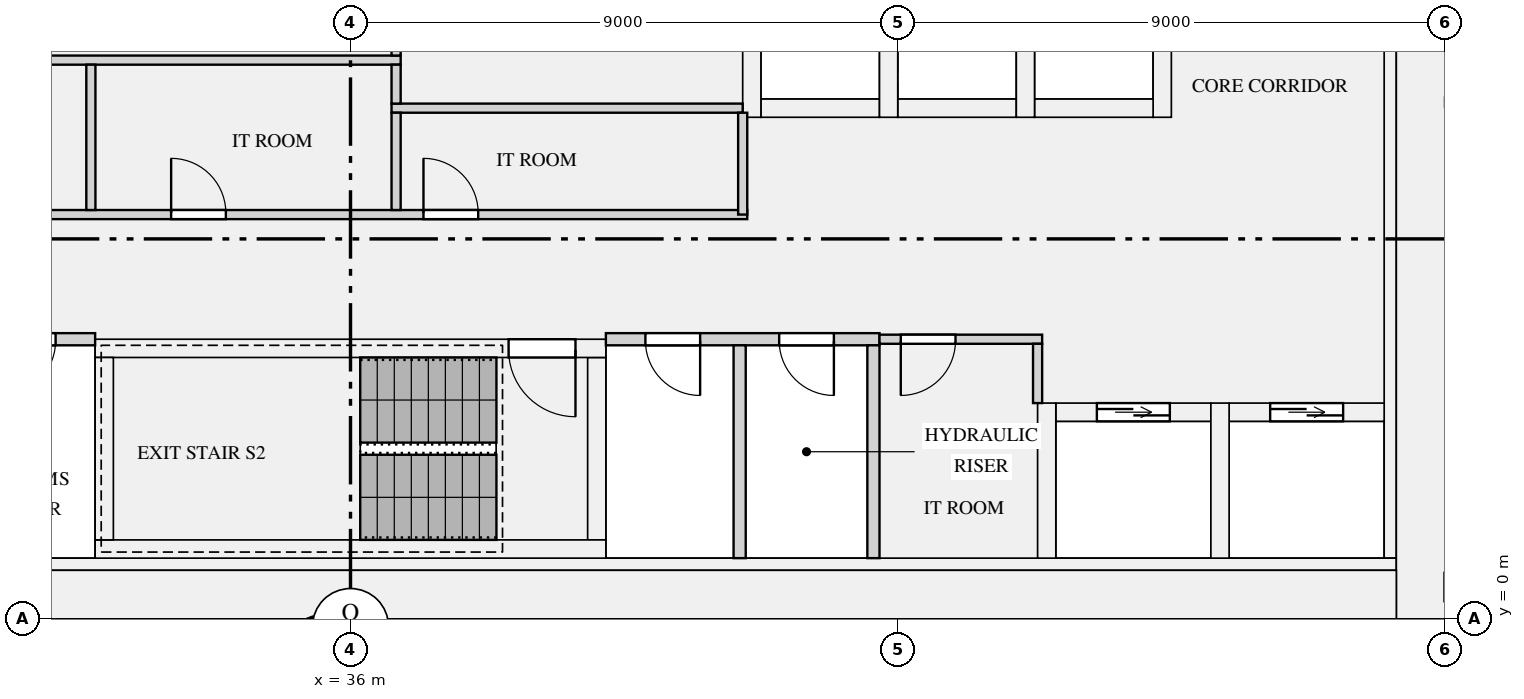
"""IFC4 building model, lengths in metres.
Left out: names, types, materials, properties, quantities, classifications, styles, units other than length and angle.
Written with IfcOpenShell. Run it as: python <this file> out.ifc"""

import sys

from ifc_helpers import new_model, si_unit, direction, frame, frame_2d, origin, place, context, subcontext, project, spatial, rectangle, extrude, element, fill, save


model = new_model("IFC4")
c1 = context("Model", 3, precision=1e-05, world=origin(), true_north=direction((0.0, 1.0)))
c2 = subcontext(c1, "Body", "Model", "MODEL_VIEW")
j1 = project(units=[si_unit("LENGTHUNIT", "METRE"), si_unit("PLANEANGLEUNIT", "RADIAN")], contexts=[c1])
p1 = place(None, origin())
s1 = spatial("IfcSite", under=j1, at=p1, CompositionType="ELEMENT")
p2 = place(p1, origin())
s2 = spatial("IfcBuilding", under=s1, at=p2, CompositionType="ELEMENT")
p3 = place(p2, frame((0.0, 0.0, 118.2)))
s3 = spatial("IfcBuildingStorey", under=s2, at=p3, CompositionType="ELEMENT", Elevation=118.2)
p4 = place(p3, frame((53.6, 0.0, 0.0), z_axis=(0.0, 0.0, 1.0), x_axis=(0.0, 1.0, 0.0)))
e1 = element("IfcWall", 1, at=p4, inside=s3, PredefinedType="SHEAR", context=c2, shape_type="SweptSolid", body=[
    extrude(rectangle(XDim=12.5, YDim=0.8, at=frame_2d((6.25, 0.0))), origin(), (0.0, 0.0, 1.0), 3.15),
])
p5 = place(p3, frame((18.8, 0.4, 0.0), z_axis=(0.0, 0.0, 1.0), x_axis=(1.0, 0.0, 0.0)))
e2 = element("IfcWall", 2, at=p5, inside=s3, PredefinedType="SHEAR", context=c2, shape_type="SweptSolid", body=[
    extrude(rectangle(XDim=34.4, YDim=0.8, at=frame_2d((17.2, 0.0))), origin(), (0.0, 0.0, 1.0), 3.15),
])
p6 = place(p3, frame((53.1, 1.0, 0.0), z_axis=(0.0, 0.0, 1.0), x_axis=(0.0, 1.0, 0.0)))
e3 = element("IfcWall", 3, at=p6, inside=s3, PredefinedType="SHEAR", context=c2, shape_type="SweptSolid", body=[
    extrude(rectangle(XDim=10.9, YDim=0.2, at=frame_2d((5.45, 0.0))), origin(), (0.0, 0.0, 1.0), 3.15),
])
p7 = place(p3, frame((18.8, 0.9, 0.0), z_axis=(0.0, 0.0, 1.0), x_axis=(1.0, 0.0, 0.0)))
e4 = element("IfcWall", 4, at=p7, inside=s3, PredefinedType="SHEAR", context=c2, shape_type="SweptSolid", body=[
    extrude(rectangle(XDim=34.4, YDim=0.2, at=frame_2d((17.2, 0.0))), origin(), (0.0, 0.0, 1.0), 3.15),
])
p8 = place(p3, frame((42.75, 8.4, 0.0), z_axis=(0.0, 0.0, 1.0), x_axis=(1.0, 0.0, 0.0)))
e5 = element("IfcWall", 5, at=p8, inside=s3, PredefinedType="SHEAR", context=c2, shape_type="SweptSolid", body=[
    extrude(rectangle(XDim=1.95, YDim=0.3, at=frame_2d((0.975, 0.0))), origin(), (0.0, 0.0, 1.0), 3.15),
])
p9 = place(p3, frame((42.6, 8.25, 0.0), z_axis=(0.0, 0.0, 1.0), x_axis=(0.0, 1.0, 0.0)))
e6 = element("IfcWall", 6, at=p9, inside=s3, PredefinedType="SHEAR", context=c2, shape_type="SweptSolid", body=[
    extrude(rectangle(XDim=3.65, YDim=0.3, at=frame_2d((1.825, 0.0))), origin(), (0.0, 0.0, 1.0), 3.15),
])
p10 = place(p3, frame((45.0, 8.4, 0.0), z_axis=(0.0, 0.0, 1.0), x_axis=(1.0, 0.0, 0.0)))
e7 = element("IfcWall", 7, at=p10, inside=s3, PredefinedType="SHEAR", context=c2, shape_type="SweptSolid", body=[
    extrude(rectangle(XDim=1.95, YDim=0.3, at=frame_2d((0.975, 0.0))), origin(), (0.0, 0.0, 1.0), 3.15),
])
p11 = place(p3, frame((44.85, 8.25, 0.0), z_axis=(0.0, 0.0, 1.0), x_axis=(0.0, 1.0, 0.0)))
e8 = element("IfcWall", 8, at=p11, inside=s3, PredefinedType="SHEAR", context=c2, shape_type="SweptSolid", body=[
    extrude(rectangle(XDim=3.65, YDim=0.3, at=frame_2d((1.825, 0.0))), origin(), (0.0, 0.0, 1.0), 3.15),
])
p12 = place(p3, frame((47.25, 8.4, 0.0), z_axis=(0.0, 0.0, 1.0), x_axis=(1.0, 0.0, 0.0)))
e9 = element("IfcWall", 9, at=p12, inside=s3, PredefinedType="SHEAR", context=c2, shape_type="SweptSolid", body=[
    extrude(rectangle(XDim=1.95, YDim=0.3, at=frame_2d((0.975, 0.0))), origin(), (0.0, 0.0, 1.0), 3.15),
])
for number, where, z_axis, x_axis in (
    (10, (47.1, 8.25, 0.0), (0.0, 0.0, 1.0), (0.0, 1.0, 0.0)),
    (11, (49.35, 8.25, 0.0), (0.0, 0.0, 1.0), (0.0, 1.0, 0.0)),
):
    element("IfcWall", number, at=place(p3, frame(where, z_axis=z_axis, x_axis=x_axis)), inside=s3, PredefinedType="SHEAR", context=c2, shape_type="SweptSolid", body=[
        extrude(rectangle(XDim=3.65, YDim=0.3, at=frame_2d((1.825, 0.0))), origin(), (0.0, 0.0, 1.0), 3.15),
    ])
p13 = place(p3, frame((47.6, 3.4, 0.0), z_axis=(0.0, 0.0, 1.0), x_axis=(1.0, 0.0, 0.0)))
e12 = element("IfcWall", 12, at=p13, inside=s3, PredefinedType="SHEAR", context=c2, shape_type="SweptSolid", body=[
    extrude(rectangle(XDim=2.55, YDim=0.3, at=frame_2d((1.275, 0.0))), origin(), (0.0, 0.0, 1.0), 3.15),
])
p14 = place(p13, frame((0.675, 0.0, 0.0)))
e13 = element("IfcOpeningElement", 13, at=p14, cuts=e12, PredefinedType="OPENING", context=c2, shape_type="SweptSolid", body=[
    extrude(rectangle(XDim=1.2, YDim=2.1, at=frame_2d((0.6, 1.05))), frame((0.0, 0.16, 0.0), z_axis=(0.0, -1.0, 0.0), x_axis=(1.0, 0.0, 0.0)), (0.0, 0.0, 1.0), 0.32),
])
p15 = place(p3, frame((47.45, 1.0, 0.0), z_axis=(0.0, 0.0, 1.0), x_axis=(0.0, 1.0, 0.0)))
e14 = element("IfcWall", 14, at=p15, inside=s3, PredefinedType="SHEAR", context=c2, shape_type="SweptSolid", body=[
    extrude(rectangle(XDim=2.55, YDim=0.3, at=frame_2d((1.275, 0.0))), origin(), (0.0, 0.0, 1.0), 3.15),
])
p16 = place(p3, frame((50.45, 3.4, 0.0), z_axis=(0.0, 0.0, 1.0), x_axis=(1.0, 0.0, 0.0)))
e15 = element("IfcWall", 15, at=p16, inside=s3, PredefinedType="SHEAR", context=c2, shape_type="SweptSolid", body=[
    extrude(rectangle(XDim=2.55, YDim=0.3, at=frame_2d((1.275, 0.0))), origin(), (0.0, 0.0, 1.0), 3.15),
])
p17 = place(p16, frame((0.675, 0.0, 0.0)))
e16 = element("IfcOpeningElement", 16, at=p17, cuts=e15, PredefinedType="OPENING", context=c2, shape_type="SweptSolid", body=[
    extrude(rectangle(XDim=1.2, YDim=2.1, at=frame_2d((0.6, 1.05))), frame((0.0, 0.16, 0.0), z_axis=(0.0, -1.0, 0.0), x_axis=(1.0, 0.0, 0.0)), (0.0, 0.0, 1.0), 0.32),
])
p18 = place(p3, frame((50.3, 1.0, 0.0), z_axis=(0.0, 0.0, 1.0), x_axis=(0.0, 1.0, 0.0)))
e17 = element("IfcWall", 17, at=p18, inside=s3, PredefinedType="SHEAR", context=c2, shape_type="SweptSolid", body=[
    extrude(rectangle(XDim=2.55, YDim=0.3, at=frame_2d((1.275, 0.0))), origin(), (0.0, 0.0, 1.0), 3.15),
])
p19 = place(p3, frame((31.8, 1.15, 0.0), z_axis=(0.0, 0.0, 1.0), x_axis=(1.0, 0.0, 0.0)))
e18 = element("IfcWall", 18, at=p19, inside=s3, PredefinedType="SHEAR", context=c2, shape_type="SweptSolid", body=[
    extrude(rectangle(XDim=8.4, YDim=0.3, at=frame_2d((4.2, 0.0))), origin(), (0.0, 0.0, 1.0), 3.15),
])
p20 = place(p3, frame((31.8, 4.45, 0.0), z_axis=(0.0, 0.0, 1.0), x_axis=(1.0, 0.0, 0.0)))
e19 = element("IfcWall", 19, at=p20, inside=s3, PredefinedType="SHEAR", context=c2, shape_type="SweptSolid", body=[
    extrude(rectangle(XDim=8.4, YDim=0.3, at=frame_2d((4.2, 0.0))), origin(), (0.0, 0.0, 1.0), 3.15),
])
p21 = place(p20, frame((6.8, 0.0, 0.0)))
e20 = element("IfcOpeningElement", 20, at=p21, cuts=e19, PredefinedType="OPENING", context=c2, shape_type="SweptSolid", body=[
    extrude(rectangle(XDim=1.1, YDim=2.1, at=frame_2d((0.55, 1.05))), frame((0.0, 0.16, 0.0), z_axis=(0.0, -1.0, 0.0), x_axis=(1.0, 0.0, 0.0)), (0.0, 0.0, 1.0), 0.32),
])
for number, where, z_axis, x_axis in (
    (21, (31.95, 1.3, 0.0), (0.0, 0.0, 1.0), (0.0, 1.0, 0.0)),
    (22, (40.05, 1.3, 0.0), (0.0, 0.0, 1.0), (0.0, 1.0, 0.0)),
):
    element("IfcWall", number, at=place(p3, frame(where, z_axis=z_axis, x_axis=x_axis)), inside=s3, PredefinedType="SHEAR", context=c2, shape_type="SweptSolid", body=[
        extrude(rectangle(XDim=3.0, YDim=0.3, at=frame_2d((1.5, 0.0))), origin(), (0.0, 0.0, 1.0), 3.15),
    ])
p22 = place(p3, frame((27.3, 4.6, 0.0), z_axis=(0.0, 0.0, 1.0), x_axis=(1.0, 0.0, 0.0)))
e23 = element("IfcWall", 23, at=p22, inside=s3, PredefinedType="PARTITIONING", context=c2, shape_type="SweptSolid", body=[
    extrude(rectangle(XDim=4.5, YDim=0.2, at=frame_2d((2.25, 0.0))), origin(), (0.0, 0.0, 1.0), 2.83),
])
p23 = place(p22, frame((0.75, 0.0, 0.0)))
e24 = element("IfcOpeningElement", 24, at=p23, cuts=e23, PredefinedType="OPENING", context=c2, shape_type="SweptSolid", body=[
    extrude(rectangle(XDim=0.9, YDim=2.1, at=frame_2d((0.45, 1.05))), frame((0.0, 0.11, 0.0), z_axis=(0.0, -1.0, 0.0), x_axis=(1.0, 0.0, 0.0)), (0.0, 0.0, 1.0), 0.22),
])
p24 = place(p22, frame((2.95, 0.0, 0.0)))
e25 = element("IfcOpeningElement", 25, at=p24, cuts=e23, PredefinedType="OPENING", context=c2, shape_type="SweptSolid", body=[
    extrude(rectangle(XDim=0.9, YDim=2.1, at=frame_2d((0.45, 1.05))), frame((0.0, 0.11, 0.0), z_axis=(0.0, -1.0, 0.0), x_axis=(1.0, 0.0, 0.0)), (0.0, 0.0, 1.0), 0.22),
])
p25 = place(p3, frame((40.2, 4.6, 0.0), z_axis=(0.0, 0.0, 1.0), x_axis=(1.0, 0.0, 0.0)))
e26 = element("IfcWall", 26, at=p25, inside=s3, PredefinedType="PARTITIONING", context=c2, shape_type="SweptSolid", body=[
    extrude(rectangle(XDim=4.5, YDim=0.2, at=frame_2d((2.25, 0.0))), origin(), (0.0, 0.0, 1.0), 2.83),
])
p26 = place(p25, frame((0.65, 0.0, 0.0)))
e27 = element("IfcOpeningElement", 27, at=p26, cuts=e26, PredefinedType="OPENING", context=c2, shape_type="SweptSolid", body=[
    extrude(rectangle(XDim=0.9, YDim=2.1, at=frame_2d((0.45, 1.05))), frame((0.0, 0.11, 0.0), z_axis=(0.0, -1.0, 0.0), x_axis=(1.0, 0.0, 0.0)), (0.0, 0.0, 1.0), 0.22),
])
p27 = place(p25, frame((2.85, 0.0, 0.0)))
e28 = element("IfcOpeningElement", 28, at=p27, cuts=e26, PredefinedType="OPENING", context=c2, shape_type="SweptSolid", body=[
    extrude(rectangle(XDim=0.9, YDim=2.1, at=frame_2d((0.45, 1.05))), frame((0.0, 0.11, 0.0), z_axis=(0.0, -1.0, 0.0), x_axis=(1.0, 0.0, 0.0)), (0.0, 0.0, 1.0), 0.22),
])
p28 = place(p3, frame((44.7, 4.6, 0.0), z_axis=(0.0, 0.0, 1.0), x_axis=(1.0, 0.0, 0.0)))
e29 = element("IfcWall", 29, at=p28, inside=s3, PredefinedType="PARTITIONING", context=c2, shape_type="SweptSolid", body=[
    extrude(rectangle(XDim=2.675, YDim=0.15, at=frame_2d((1.337, 0.0))), origin(), (0.0, 0.0, 1.0), 2.83),
])
p29 = place(p28, frame((0.35, 0.0, 0.0)))
e30 = element("IfcOpeningElement", 30, at=p29, cuts=e29, PredefinedType="OPENING", context=c2, shape_type="SweptSolid", body=[
    extrude(rectangle(XDim=0.9, YDim=2.1, at=frame_2d((0.45, 1.05))), frame((0.0, 0.085, 0.0), z_axis=(0.0, -1.0, 0.0), x_axis=(1.0, 0.0, 0.0)), (0.0, 0.0, 1.0), 0.17),
])
p30 = place(p3, frame((22.725, 6.65, 0.0), z_axis=(0.0, 0.0, 1.0), x_axis=(1.0, 0.0, 0.0)))
e31 = element("IfcWall", 31, at=p30, inside=s3, PredefinedType="PARTITIONING", context=c2, shape_type="SweptSolid", body=[
    extrude(rectangle(XDim=19.8, YDim=0.15, at=frame_2d((9.9, 0.0))), origin(), (0.0, 0.0, 1.0), 2.83),
])
p31 = place(p30, frame((0.825, 0.0, 0.0)))
e32 = element("IfcOpeningElement", 32, at=p31, cuts=e31, PredefinedType="OPENING", context=c2, shape_type="SweptSolid", body=[
    extrude(rectangle(XDim=0.9, YDim=2.1, at=frame_2d((0.45, 1.05))), frame((0.0, 0.085, 0.0), z_axis=(0.0, -1.0, 0.0), x_axis=(1.0, 0.0, 0.0)), (0.0, 0.0, 1.0), 0.17),
])
p32 = place(p30, frame((5.825, 0.0, 0.0)))
e33 = element("IfcOpeningElement", 33, at=p32, cuts=e31, PredefinedType="OPENING", context=c2, shape_type="SweptSolid", body=[
    extrude(rectangle(XDim=0.9, YDim=2.1, at=frame_2d((0.45, 1.05))), frame((0.0, 0.085, 0.0), z_axis=(0.0, -1.0, 0.0), x_axis=(1.0, 0.0, 0.0)), (0.0, 0.0, 1.0), 0.17),
])
p33 = place(p30, frame((10.325, 0.0, 0.0)))
e34 = element("IfcOpeningElement", 34, at=p33, cuts=e31, PredefinedType="OPENING", context=c2, shape_type="SweptSolid", body=[
    extrude(rectangle(XDim=0.9, YDim=2.1, at=frame_2d((0.45, 1.05))), frame((0.0, 0.085, 0.0), z_axis=(0.0, -1.0, 0.0), x_axis=(1.0, 0.0, 0.0)), (0.0, 0.0, 1.0), 0.17),
])
p34 = place(p30, frame((14.475, 0.0, 0.0)))
e35 = element("IfcOpeningElement", 35, at=p34, cuts=e31, PredefinedType="OPENING", context=c2, shape_type="SweptSolid", body=[
    extrude(rectangle(XDim=0.9, YDim=2.1, at=frame_2d((0.45, 1.05))), frame((0.0, 0.085, 0.0), z_axis=(0.0, -1.0, 0.0), x_axis=(1.0, 0.0, 0.0)), (0.0, 0.0, 1.0), 0.17),
])
p35 = place(p3, frame((36.675, 8.4, 0.0), z_axis=(0.0, 0.0, 1.0), x_axis=(1.0, 0.0, 0.0)))
e36 = element("IfcWall", 36, at=p35, inside=s3, PredefinedType="PARTITIONING", context=c2, shape_type="SweptSolid", body=[
    extrude(rectangle(XDim=5.775, YDim=0.15, at=frame_2d((2.887, 0.0))), origin(), (0.0, 0.0, 1.0), 2.83),
])
p36 = place(p3, frame((28.275, 9.19, 0.0), z_axis=(0.0, 0.0, 1.0), x_axis=(1.0, 0.0, 0.0)))
e37 = element("IfcWall", 37, at=p36, inside=s3, PredefinedType="PARTITIONING", context=c2, shape_type="SweptSolid", body=[
    extrude(rectangle(XDim=8.55, YDim=0.15, at=frame_2d((4.275, 0.0))), origin(), (0.0, 0.0, 1.0), 2.83),
])
for number, where, z_axis, x_axis in (
    (38, (42.4, 1.0, 0.0), (0.0, 0.0, 1.0), (0.0, 1.0, 0.0)),
    (39, (44.6, 1.0, 0.0), (0.0, 0.0, 1.0), (0.0, 1.0, 0.0)),
):
    element("IfcWall", number, at=place(p3, frame(where, z_axis=z_axis, x_axis=x_axis)), inside=s3, PredefinedType="PARTITIONING", context=c2, shape_type="SweptSolid", body=[
        extrude(rectangle(XDim=3.5, YDim=0.2, at=frame_2d((1.75, 0.0))), origin(), (0.0, 0.0, 1.0), 2.83),
    ])
p37 = place(p3, frame((47.3, 3.55, 0.0), z_axis=(0.0, 0.0, 1.0), x_axis=(0.0, 1.0, 0.0)))
e40 = element("IfcWall", 40, at=p37, inside=s3, PredefinedType="PARTITIONING", context=c2, shape_type="SweptSolid", body=[
    extrude(rectangle(XDim=0.975, YDim=0.15, at=frame_2d((0.487, 0.0))), origin(), (0.0, 0.0, 1.0), 2.83),
])
p38 = place(p3, frame((42.45, 6.65, 0.0), z_axis=(0.0, 0.0, 1.0), x_axis=(0.0, 1.0, 0.0)))
e41 = element("IfcWall", 41, at=p38, inside=s3, PredefinedType="PARTITIONING", context=c2, shape_type="SweptSolid", body=[
    extrude(rectangle(XDim=1.675, YDim=0.15, at=frame_2d((0.837, 0.0))), origin(), (0.0, 0.0, 1.0), 2.83),
])
p39 = place(p3, frame((31.73, 6.725, 0.0), z_axis=(0.0, 0.0, 1.0), x_axis=(0.0, 1.0, 0.0)))
e42 = element("IfcWall", 42, at=p39, inside=s3, PredefinedType="PARTITIONING", context=c2, shape_type="SweptSolid", body=[
    extrude(rectangle(XDim=2.39, YDim=0.15, at=frame_2d((1.195, 0.0))), origin(), (0.0, 0.0, 1.0), 2.83),
])
p40 = place(p3, frame((36.75, 6.725, 0.0), z_axis=(0.0, 0.0, 1.0), x_axis=(0.0, 1.0, 0.0)))
e43 = element("IfcWall", 43, at=p40, inside=s3, PredefinedType="PARTITIONING", context=c2, shape_type="SweptSolid", body=[
    extrude(rectangle(XDim=1.6, YDim=0.15, at=frame_2d((0.8, 0.0))), origin(), (0.0, 0.0, 1.0), 2.83),
])
p41 = place(p3, frame((36.75, 8.475, 0.0), z_axis=(0.0, 0.0, 1.0), x_axis=(0.0, 1.0, 0.0)))
e44 = element("IfcWall", 44, at=p41, inside=s3, PredefinedType="PARTITIONING", context=c2, shape_type="SweptSolid", body=[
    extrude(rectangle(XDim=0.64, YDim=0.15, at=frame_2d((0.32, 0.0))), origin(), (0.0, 0.0, 1.0), 2.83),
])
p42 = place(p3, frame((36.75, 9.265, 0.0), z_axis=(0.0, 0.0, 1.0), x_axis=(0.0, 1.0, 0.0)))
e45 = element("IfcWall", 45, at=p42, inside=s3, PredefinedType="PARTITIONING", context=c2, shape_type="SweptSolid", body=[
    extrude(rectangle(XDim=2.635, YDim=0.15, at=frame_2d((1.317, 0.0))), origin(), (0.0, 0.0, 1.0), 2.83),
])
p43 = place(p3, frame((54.0, 8.5, 0.0), z_axis=(0.0, 0.0, 1.0), x_axis=(1.0, 0.0, 0.0)))
e46 = element("IfcWall", 46, at=p43, inside=s3, PredefinedType="PARTITIONING", context=c2, shape_type="SweptSolid", body=[
    extrude(rectangle(XDim=17.925, YDim=0.15, at=frame_2d((8.962, 0.0))), origin(), (0.0, 0.0, 1.0), 2.83),
])
p44 = place(p43, frame((1.8, 0.0, 0.0)))
e47 = element("IfcOpeningElement", 47, at=p44, cuts=e46, PredefinedType="OPENING", context=c2, shape_type="SweptSolid", body=[
    extrude(rectangle(XDim=0.9, YDim=2.1, at=frame_2d((0.45, 1.05))), frame((0.0, 0.085, 0.0), z_axis=(0.0, -1.0, 0.0), x_axis=(1.0, 0.0, 0.0)), (0.0, 0.0, 1.0), 0.17),
])
p45 = place(p43, frame((8.25, 0.0, 0.0)))
e48 = element("IfcOpeningElement", 48, at=p45, cuts=e46, PredefinedType="OPENING", context=c2, shape_type="SweptSolid", body=[
    extrude(rectangle(XDim=1.5, YDim=2.1, at=frame_2d((0.75, 1.05))), frame((0.0, 0.085, 0.0), z_axis=(0.0, -1.0, 0.0), x_axis=(1.0, 0.0, 0.0)), (0.0, 0.0, 1.0), 0.17),
])
p46 = place(p43, frame((15.3, 0.0, 0.0)))
e49 = element("IfcOpeningElement", 49, at=p46, cuts=e46, PredefinedType="OPENING", context=c2, shape_type="SweptSolid", body=[
    extrude(rectangle(XDim=0.9, YDim=2.1, at=frame_2d((0.45, 1.05))), frame((0.0, 0.085, 0.0), z_axis=(0.0, -1.0, 0.0), x_axis=(1.0, 0.0, 0.0)), (0.0, 0.0, 1.0), 0.17),
])
p47 = place(p14, origin())
e50 = element("IfcDoor", 50, at=p47, inside=s3, OperationType="DOUBLE_DOOR_SLIDING", PredefinedType="DOOR", context=c2, shape_type="SweptSolid", body=[
    extrude(rectangle(XDim=1.2, YDim=2.1, at=frame_2d((0.6, 1.05))), frame((0.0, 0.025, 0.0), z_axis=(0.0, -1.0, 0.0), x_axis=(1.0, 0.0, 0.0)), (0.0, 0.0, 1.0), 0.05),
])
fill(e13, e50)
p48 = place(p17, origin())
e51 = element("IfcDoor", 51, at=p48, inside=s3, OperationType="DOUBLE_DOOR_SLIDING", PredefinedType="DOOR", context=c2, shape_type="SweptSolid", body=[
    extrude(rectangle(XDim=1.2, YDim=2.1, at=frame_2d((0.6, 1.05))), frame((0.0, 0.025, 0.0), z_axis=(0.0, -1.0, 0.0), x_axis=(1.0, 0.0, 0.0)), (0.0, 0.0, 1.0), 0.05),
])
fill(e16, e51)
p49 = place(p21, frame((1.1, 0.0, 0.0), z_axis=(0.0, 0.0, 1.0), x_axis=(-1.0, 0.0, 0.0)))
e52 = element("IfcDoor", 52, at=p49, inside=s3, OperationType="SINGLE_SWING_LEFT", PredefinedType="DOOR", context=c2, shape_type="SweptSolid", body=[
    extrude(rectangle(XDim=1.1, YDim=2.1, at=frame_2d((0.55, 1.05))), frame((0.0, 0.025, 0.0), z_axis=(0.0, -1.0, 0.0), x_axis=(1.0, 0.0, 0.0)), (0.0, 0.0, 1.0), 0.05),
])
fill(e20, e52)
p50 = place(p29, frame((0.9, 0.0, 0.0), z_axis=(0.0, 0.0, 1.0), x_axis=(-1.0, 0.0, 0.0)))
e53 = element("IfcDoor", 53, at=p50, inside=s3, OperationType="SINGLE_SWING_RIGHT", PredefinedType="DOOR", context=c2, shape_type="SweptSolid", body=[
    extrude(rectangle(XDim=0.9, YDim=2.1, at=frame_2d((0.45, 1.05))), frame((0.0, 0.025, 0.0), z_axis=(0.0, -1.0, 0.0), x_axis=(1.0, 0.0, 0.0)), (0.0, 0.0, 1.0), 0.05),
])
fill(e30, e53)
p51 = place(p33, origin())
e54 = element("IfcDoor", 54, at=p51, inside=s3, OperationType="SINGLE_SWING_LEFT", PredefinedType="DOOR", context=c2, shape_type="SweptSolid", body=[
    extrude(rectangle(XDim=0.9, YDim=2.1, at=frame_2d((0.45, 1.05))), frame((0.0, 0.025, 0.0), z_axis=(0.0, -1.0, 0.0), x_axis=(1.0, 0.0, 0.0)), (0.0, 0.0, 1.0), 0.05),
])
fill(e34, e54)
p52 = place(p34, origin())
e55 = element("IfcDoor", 55, at=p52, inside=s3, OperationType="SINGLE_SWING_LEFT", PredefinedType="DOOR", context=c2, shape_type="SweptSolid", body=[
    extrude(rectangle(XDim=0.9, YDim=2.1, at=frame_2d((0.45, 1.05))), frame((0.0, 0.025, 0.0), z_axis=(0.0, -1.0, 0.0), x_axis=(1.0, 0.0, 0.0)), (0.0, 0.0, 1.0), 0.05),
])
fill(e35, e55)
p53 = place(p24, frame((0.9, 0.0, 0.0), z_axis=(0.0, 0.0, 1.0), x_axis=(-1.0, 0.0, 0.0)))
e56 = element("IfcDoor", 56, at=p53, inside=s3, OperationType="SINGLE_SWING_RIGHT", PredefinedType="DOOR", context=c2, shape_type="SweptSolid", body=[
    extrude(rectangle(XDim=0.9, YDim=2.1, at=frame_2d((0.45, 1.05))), frame((0.0, 0.025, 0.0), z_axis=(0.0, -1.0, 0.0), x_axis=(1.0, 0.0, 0.0)), (0.0, 0.0, 1.0), 0.05),
])
fill(e25, e56)
p54 = place(p26, frame((0.9, 0.0, 0.0), z_axis=(0.0, 0.0, 1.0), x_axis=(-1.0, 0.0, 0.0)))
e57 = element("IfcDoor", 57, at=p54, inside=s3, OperationType="SINGLE_SWING_LEFT", PredefinedType="DOOR", context=c2, shape_type="SweptSolid", body=[
    extrude(rectangle(XDim=0.9, YDim=2.1, at=frame_2d((0.45, 1.05))), frame((0.0, 0.025, 0.0), z_axis=(0.0, -1.0, 0.0), x_axis=(1.0, 0.0, 0.0)), (0.0, 0.0, 1.0), 0.05),
])
fill(e27, e57)
p55 = place(p27, frame((0.9, 0.0, 0.0), z_axis=(0.0, 0.0, 1.0), x_axis=(-1.0, 0.0, 0.0)))
e58 = element("IfcDoor", 58, at=p55, inside=s3, OperationType="SINGLE_SWING_LEFT", PredefinedType="DOOR", context=c2, shape_type="SweptSolid", body=[
    extrude(rectangle(XDim=0.9, YDim=2.1, at=frame_2d((0.45, 1.05))), frame((0.0, 0.025, 0.0), z_axis=(0.0, -1.0, 0.0), x_axis=(1.0, 0.0, 0.0)), (0.0, 0.0, 1.0), 0.05),
])
fill(e28, e58)
save(model, sys.argv[1])
